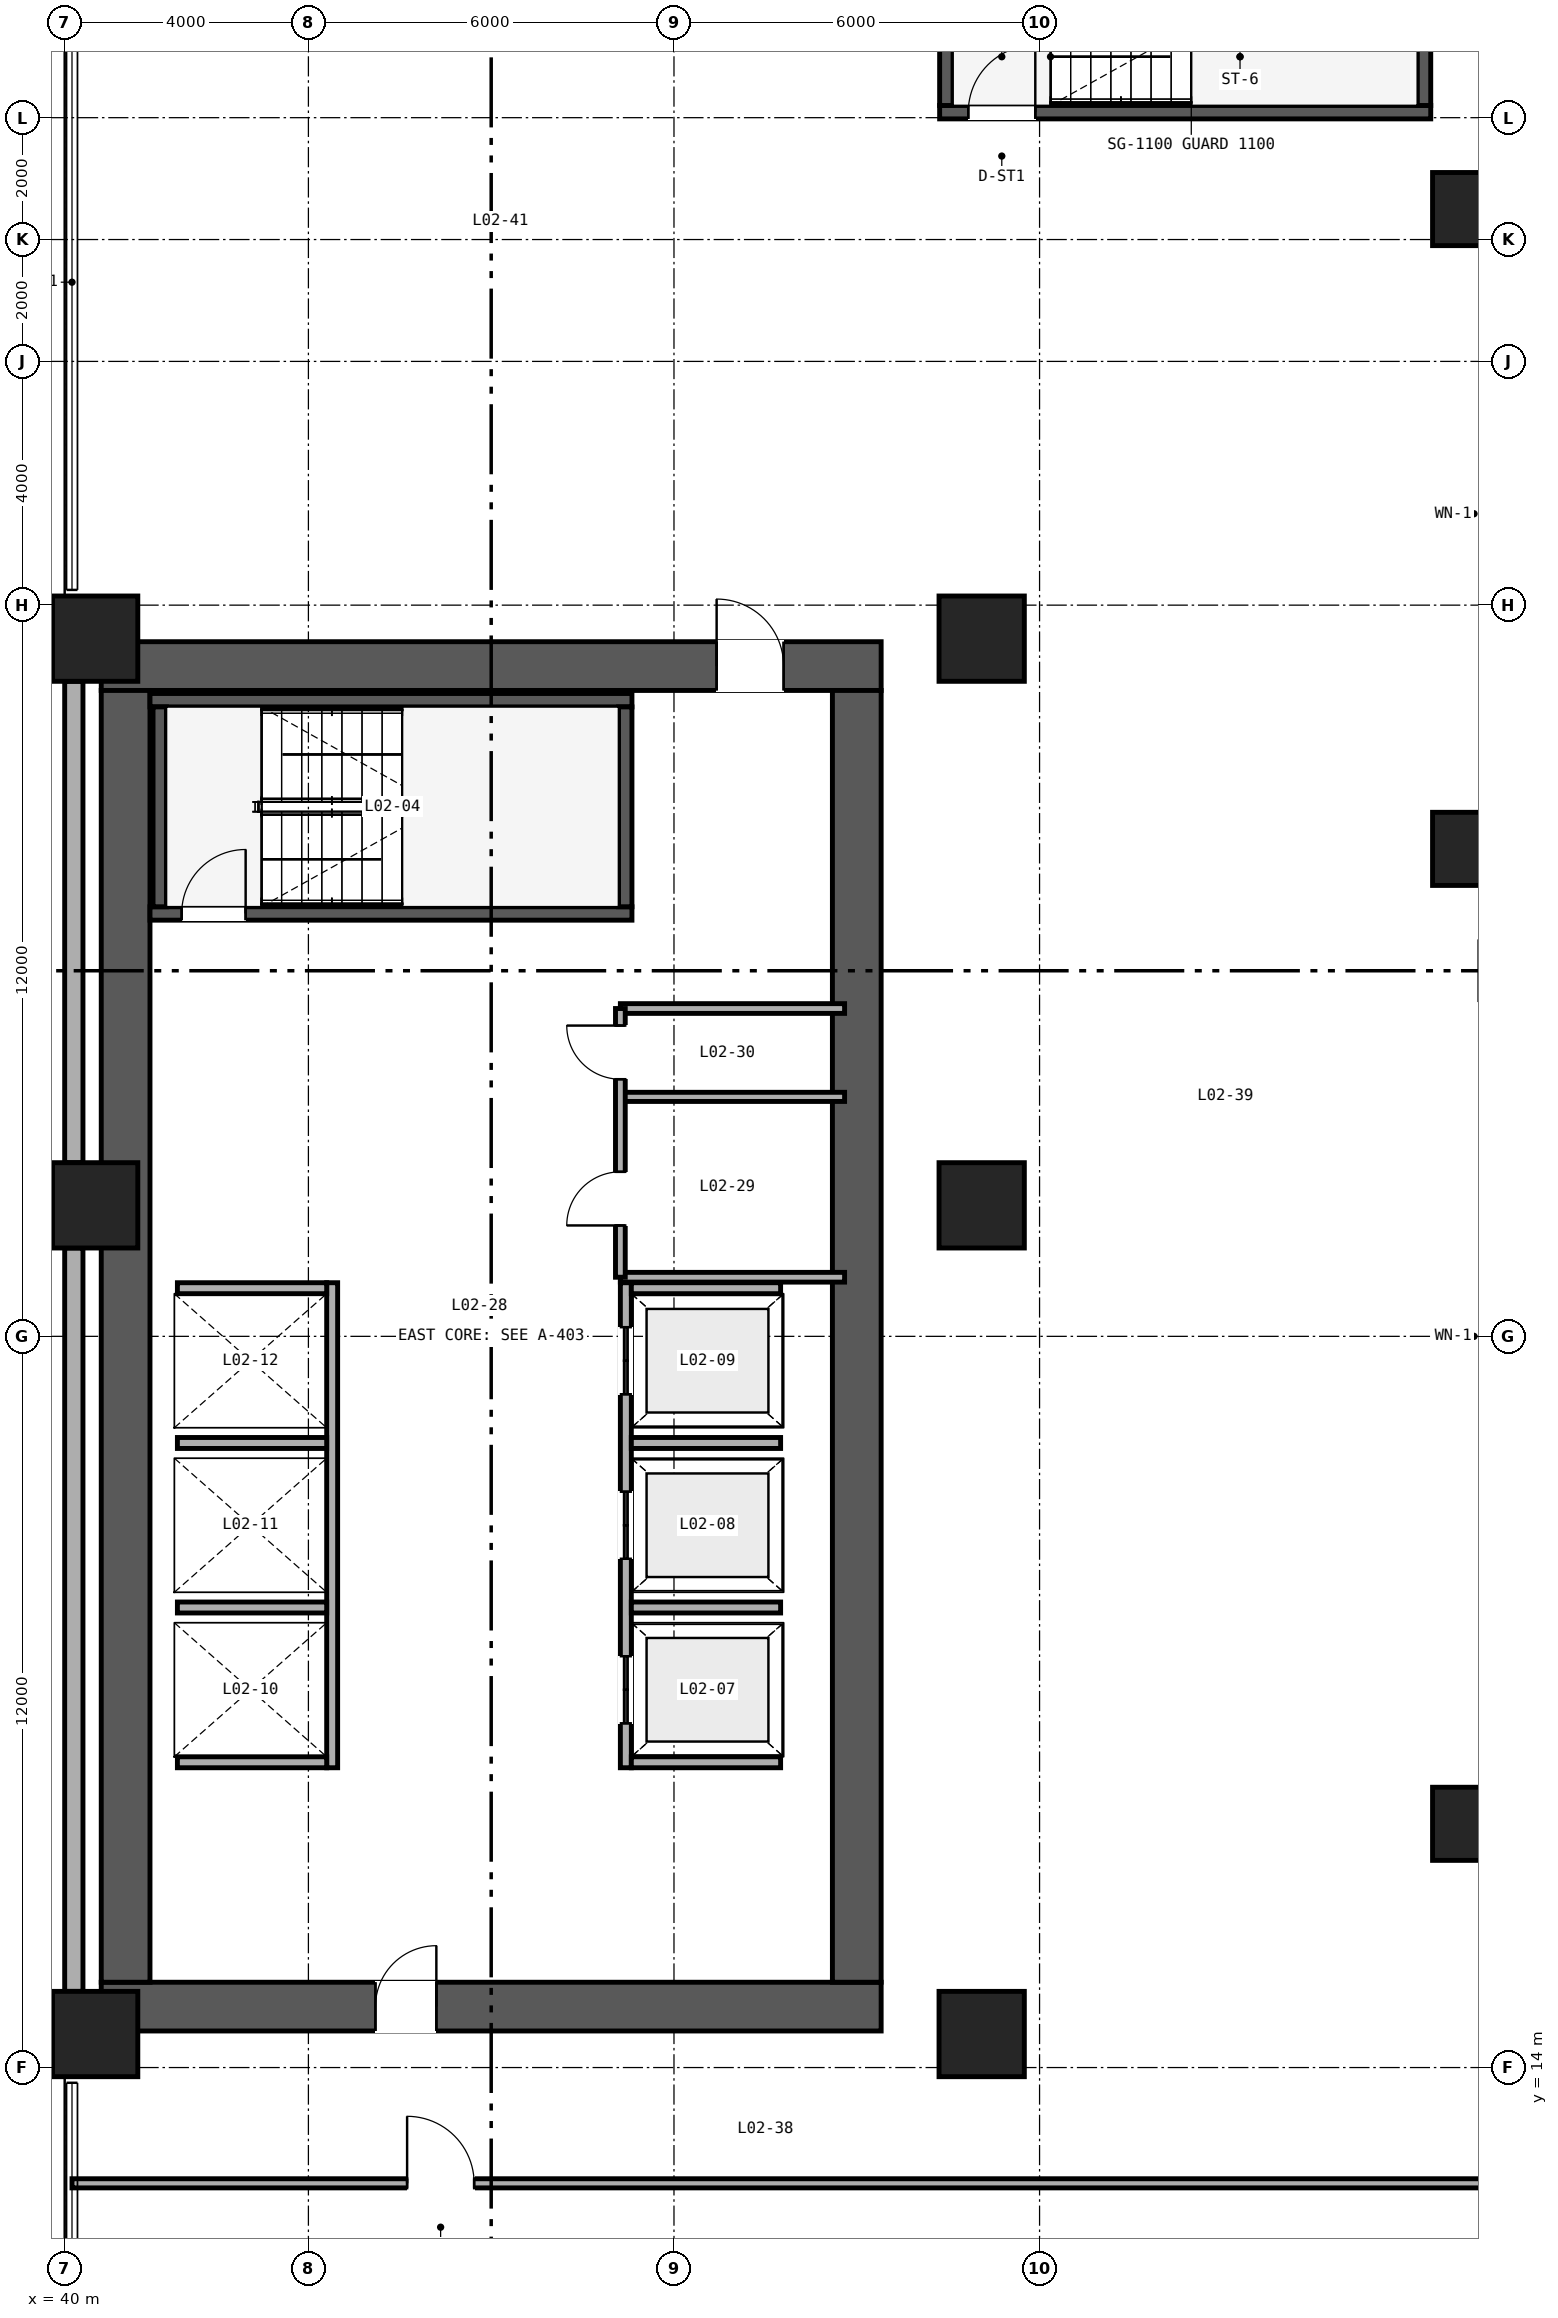
"""IFC4 building model, lengths in metres.
Left out: names, types, materials, properties, quantities, classifications, styles, units other than length and angle.
Written with IfcOpenShell. Run it as: python <this file> out.ifc"""

import sys

from ifc_helpers import new_model, si_unit, direction, frame, frame_2d, origin, origin_2d, place, context, subcontext, project, spatial, rectangle, extrude, source, transform, mapped, element, fill, save


model = new_model("IFC4")
c1 = context("Model", 3, precision=1e-05, world=origin(), true_north=direction((0.0, 1.0)))
c2 = subcontext(c1, "Body", "Model", "MODEL_VIEW")
j1 = project(units=[si_unit("LENGTHUNIT", "METRE"), si_unit("PLANEANGLEUNIT", "RADIAN")], contexts=[c1])
p1 = place(None, origin())
s1 = spatial("IfcSite", under=j1, at=p1, CompositionType="ELEMENT")
p2 = place(p1, origin())
s2 = spatial("IfcBuilding", under=s1, at=p2, CompositionType="ELEMENT")
p3 = place(p2, frame((0.0, 0.0, 6.0)))
s3 = spatial("IfcBuildingStorey", under=s2, at=p3, CompositionType="ELEMENT", Elevation=6.0)
p4 = place(p3, frame((40.6, 15.0, 0.0), z_axis=(0.0, 0.0, 1.0), x_axis=(1.0, 0.0, 0.0)))
e1 = element("IfcWall", 1, at=p4, inside=s3, PredefinedType="SHEAR", context=c2, shape_type="SweptSolid", body=[
    extrude(rectangle(XDim=12.8, YDim=0.8, at=frame_2d((6.4, 0.0))), origin(), (0.0, 0.0, 1.0), 5.08),
])
p5 = place(p4, frame((4.5, 0.0, 0.0)))
e2 = element("IfcOpeningElement", 2, at=p5, cuts=e1, PredefinedType="OPENING", context=c2, shape_type="SweptSolid", body=[
    extrude(rectangle(XDim=1.0, YDim=2.15, at=frame_2d((0.5, 1.075))), frame((0.0, 0.41, 0.0), z_axis=(0.0, -1.0, 0.0), x_axis=(1.0, 0.0, 0.0)), (0.0, 0.0, 1.0), 0.82),
])
p6 = place(p3, frame((40.6, 37.0, 0.0), z_axis=(0.0, 0.0, 1.0), x_axis=(1.0, 0.0, 0.0)))
e3 = element("IfcWall", 3, at=p6, inside=s3, PredefinedType="SHEAR", context=c2, shape_type="SweptSolid", body=[
    extrude(rectangle(XDim=12.8, YDim=0.8, at=frame_2d((6.4, 0.0))), origin(), (0.0, 0.0, 1.0), 5.08),
])
p7 = place(p6, frame((10.1, 0.0, 0.0)))
e4 = element("IfcOpeningElement", 4, at=p7, cuts=e3, PredefinedType="OPENING", context=c2, shape_type="SweptSolid", body=[
    extrude(rectangle(XDim=1.1, YDim=2.15, at=frame_2d((0.55, 1.075))), frame((0.0, 0.41, 0.0), z_axis=(0.0, -1.0, 0.0), x_axis=(1.0, 0.0, 0.0)), (0.0, 0.0, 1.0), 0.82),
])
for number, where, z_axis, x_axis in (
    (5, (41.0, 15.4, 0.0), (0.0, 0.0, 1.0), (0.0, 1.0, 0.0)),
    (6, (53.0, 15.4, 0.0), (0.0, 0.0, 1.0), (0.0, 1.0, 0.0)),
):
    element("IfcWall", number, at=place(p3, frame(where, z_axis=z_axis, x_axis=x_axis)), inside=s3, PredefinedType="SHEAR", context=c2, shape_type="SweptSolid", body=[
        extrude(rectangle(XDim=21.2, YDim=0.8, at=frame_2d((10.6, 0.0))), origin(), (0.0, 0.0, 1.0), 5.08),
    ])
p8 = place(p3, frame((41.4, 32.94, 0.0), z_axis=(0.0, 0.0, 1.0), x_axis=(1.0, 0.0, 0.0)))
e7 = element("IfcWall", 7, at=p8, inside=s3, PredefinedType="SHEAR", context=c2, shape_type="SweptSolid", body=[
    extrude(rectangle(XDim=7.91, YDim=0.22, at=frame_2d((3.955, 0.0))), origin(), (0.0, 0.0, 1.0), 5.2),
])
p9 = place(p8, frame((0.52, 0.0, 0.0)))
e8 = element("IfcOpeningElement", 8, at=p9, cuts=e7, PredefinedType="OPENING", context=c2, shape_type="SweptSolid", body=[
    extrude(rectangle(XDim=1.05, YDim=2.15, at=frame_2d((0.525, 1.075))), frame((0.0, 0.12, 0.0), z_axis=(0.0, -1.0, 0.0), x_axis=(1.0, 0.0, 0.0)), (0.0, 0.0, 1.0), 0.24),
])
p10 = place(p3, frame((41.4, 36.44, 0.0), z_axis=(0.0, 0.0, 1.0), x_axis=(1.0, 0.0, 0.0)))
e9 = element("IfcWall", 9, at=p10, inside=s3, PredefinedType="SHEAR", context=c2, shape_type="SweptSolid", body=[
    extrude(rectangle(XDim=7.91, YDim=0.22, at=frame_2d((3.955, 0.0))), origin(), (0.0, 0.0, 1.0), 5.2),
])
for number, where, z_axis, x_axis in (
    (10, (41.56, 33.05, 0.0), (0.0, 0.0, 1.0), (0.0, 1.0, 0.0)),
    (11, (49.2, 33.05, 0.0), (0.0, 0.0, 1.0), (0.0, 1.0, 0.0)),
):
    element("IfcWall", number, at=place(p3, frame(where, z_axis=z_axis, x_axis=x_axis)), inside=s3, PredefinedType="SHEAR", context=c2, shape_type="SweptSolid", body=[
        extrude(rectangle(XDim=3.28, YDim=0.22, at=frame_2d((1.64, 0.0))), origin(), (0.0, 0.0, 1.0), 5.2),
    ])
p11 = place(p3, frame((54.36, 46.09, 0.0), z_axis=(0.0, 0.0, 1.0), x_axis=(1.0, 0.0, 0.0)))
e12 = element("IfcWall", 12, at=p11, inside=s3, PredefinedType="SHEAR", context=c2, shape_type="SweptSolid", body=[
    extrude(rectangle(XDim=8.06, YDim=0.22, at=frame_2d((4.03, 0.0))), origin(), (0.0, 0.0, 1.0), 5.2),
])
p12 = place(p11, frame((0.47, 0.0, 0.0)))
e13 = element("IfcOpeningElement", 13, at=p12, cuts=e12, PredefinedType="OPENING", context=c2, shape_type="SweptSolid", body=[
    extrude(rectangle(XDim=1.1, YDim=2.15, at=frame_2d((0.55, 1.075))), frame((0.0, 0.12, 0.0), z_axis=(0.0, -1.0, 0.0), x_axis=(1.0, 0.0, 0.0)), (0.0, 0.0, 1.0), 0.24),
])
for number, where, z_axis, x_axis in (
    (14, (54.47, 46.2, 0.0), (0.0, 0.0, 1.0), (0.0, 1.0, 0.0)),
    (15, (62.31, 46.2, 0.0), (0.0, 0.0, 1.0), (0.0, 1.0, 0.0)),
):
    element("IfcWall", number, at=place(p3, frame(where, z_axis=z_axis, x_axis=x_axis)), inside=s3, PredefinedType="SHEAR", context=c2, shape_type="SweptSolid", body=[
        extrude(rectangle(XDim=3.36, YDim=0.22, at=frame_2d((1.68, 0.0))), origin(), (0.0, 0.0, 1.0), 5.2),
    ])
m1 = source(origin(), c2, "Body", "SweptSolid", [
    extrude(rectangle(XDim=1.2, YDim=1.2, at=origin_2d()), origin(), (0.0, 0.0, 1.0), 5.08),
])
for number, where, z_axis, x_axis in (
    (16, (63.05, 18.0, 0.0), (0.0, 0.0, 1.0), (1.0, 0.0, 0.0)),
    (17, (63.05, 34.0, 0.0), (0.0, 0.0, 1.0), (1.0, 0.0, 0.0)),
    (18, (63.05, 44.5, 0.0), (0.0, 0.0, 1.0), (1.0, 0.0, 0.0)),
):
    element("IfcColumn", number, at=place(p3, frame(where, z_axis=z_axis, x_axis=x_axis)), inside=s3, PredefinedType="COLUMN", context=c2, shape_type="MappedRepresentation", body=[
        mapped(m1, transform((0.0, 0.0, 0.0), scale=1.0)),
    ])
m2 = source(origin(), c2, "Body", "SweptSolid", [
    extrude(rectangle(XDim=1.4, YDim=1.4, at=origin_2d()), origin(), (0.0, 0.0, 1.0), 5.08),
])
for number, where, z_axis, x_axis in (
    (19, (40.5, 14.55, 0.0), (0.0, 0.0, 1.0), (1.0, 0.0, 0.0)),
    (20, (55.05, 14.55, 0.0), (0.0, 0.0, 1.0), (1.0, 0.0, 0.0)),
    (21, (40.5, 28.15, 0.0), (0.0, 0.0, 1.0), (1.0, 0.0, 0.0)),
    (22, (55.05, 28.15, 0.0), (0.0, 0.0, 1.0), (1.0, 0.0, 0.0)),
    (23, (40.5, 37.45, 0.0), (0.0, 0.0, 1.0), (1.0, 0.0, 0.0)),
    (24, (55.05, 37.45, 0.0), (0.0, 0.0, 1.0), (1.0, 0.0, 0.0)),
):
    element("IfcColumn", number, at=place(p3, frame(where, z_axis=z_axis, x_axis=x_axis)), inside=s3, PredefinedType="COLUMN", context=c2, shape_type="MappedRepresentation", body=[
        mapped(m2, transform((0.0, 0.0, 0.0), scale=1.0)),
    ])
p13 = place(p3, frame((40.15, 15.25, 0.0), z_axis=(0.0, 0.0, 1.0), x_axis=(0.0, 1.0, 0.0)))
e25 = element("IfcWall", 25, at=p13, inside=s3, PredefinedType="SOLIDWALL", context=c2, shape_type="SweptSolid", body=[
    extrude(rectangle(XDim=12.2, YDim=0.3, at=frame_2d((6.1, 0.0))), origin(), (0.0, 0.0, 1.0), 4.301),
])
p14 = place(p3, frame((40.15, 28.85, 0.0), z_axis=(0.0, 0.0, 1.0), x_axis=(0.0, 1.0, 0.0)))
e26 = element("IfcWall", 26, at=p14, inside=s3, PredefinedType="SOLIDWALL", context=c2, shape_type="SweptSolid", body=[
    extrude(rectangle(XDim=7.9, YDim=0.3, at=frame_2d((3.95, 0.0))), origin(), (0.0, 0.0, 1.0), 4.623),
])
p15 = place(p3, frame((49.21, 18.92, 0.0), z_axis=(0.0, 0.0, 1.0), x_axis=(0.0, 1.0, 0.0)))
e27 = element("IfcWall", 27, at=p15, inside=s3, PredefinedType="SOLIDWALL", context=c2, shape_type="SweptSolid", body=[
    extrude(rectangle(XDim=7.96, YDim=0.18, at=frame_2d((3.98, 0.0))), origin(), (0.0, 0.0, 1.0), 5.08),
])
p16 = place(p15, frame((0.73, 0.0, 0.0)))
e28 = element("IfcOpeningElement", 28, at=p16, cuts=e27, PredefinedType="OPENING", context=c2, shape_type="SweptSolid", body=[
    extrude(rectangle(XDim=1.1, YDim=2.2, at=frame_2d((0.55, 1.1))), frame((0.0, 0.1, 0.0), z_axis=(0.0, -1.0, 0.0), x_axis=(1.0, 0.0, 0.0)), (0.0, 0.0, 1.0), 0.2),
])
p17 = place(p15, frame((3.43, 0.0, 0.0)))
e29 = element("IfcOpeningElement", 29, at=p17, cuts=e27, PredefinedType="OPENING", context=c2, shape_type="SweptSolid", body=[
    extrude(rectangle(XDim=1.1, YDim=2.2, at=frame_2d((0.55, 1.1))), frame((0.0, 0.1, 0.0), z_axis=(0.0, -1.0, 0.0), x_axis=(1.0, 0.0, 0.0)), (0.0, 0.0, 1.0), 0.2),
])
p18 = place(p15, frame((6.13, 0.0, 0.0)))
e30 = element("IfcOpeningElement", 30, at=p18, cuts=e27, PredefinedType="OPENING", context=c2, shape_type="SweptSolid", body=[
    extrude(rectangle(XDim=1.1, YDim=2.2, at=frame_2d((0.55, 1.1))), frame((0.0, 0.1, 0.0), z_axis=(0.0, -1.0, 0.0), x_axis=(1.0, 0.0, 0.0)), (0.0, 0.0, 1.0), 0.2),
])
for number, where, z_axis, x_axis in (
    (31, (49.3, 19.01, 0.0), (0.0, 0.0, 1.0), (1.0, 0.0, 0.0)),
    (32, (49.3, 26.79, 0.0), (0.0, 0.0, 1.0), (1.0, 0.0, 0.0)),
    (33, (49.3, 21.55, 0.0), (0.0, 0.0, 1.0), (1.0, 0.0, 0.0)),
    (34, (49.3, 24.25, 0.0), (0.0, 0.0, 1.0), (1.0, 0.0, 0.0)),
):
    element("IfcWall", number, at=place(p3, frame(where, z_axis=z_axis, x_axis=x_axis)), inside=s3, PredefinedType="SOLIDWALL", context=c2, shape_type="SweptSolid", body=[
        extrude(rectangle(XDim=2.45, YDim=0.18, at=frame_2d((1.225, 0.0))), origin(), (0.0, 0.0, 1.0), 5.08),
    ])
p19 = place(p3, frame((44.39, 18.92, 0.0), z_axis=(0.0, 0.0, 1.0), x_axis=(0.0, 1.0, 0.0)))
e35 = element("IfcWall", 35, at=p19, inside=s3, PredefinedType="SOLIDWALL", context=c2, shape_type="SweptSolid", body=[
    extrude(rectangle(XDim=7.96, YDim=0.18, at=frame_2d((3.98, 0.0))), origin(), (0.0, 0.0, 1.0), 5.08),
])
for number, where, z_axis, x_axis in (
    (36, (41.85, 19.01, 0.0), (0.0, 0.0, 1.0), (1.0, 0.0, 0.0)),
    (37, (41.85, 26.79, 0.0), (0.0, 0.0, 1.0), (1.0, 0.0, 0.0)),
    (38, (41.85, 21.55, 0.0), (0.0, 0.0, 1.0), (1.0, 0.0, 0.0)),
    (39, (41.85, 24.25, 0.0), (0.0, 0.0, 1.0), (1.0, 0.0, 0.0)),
):
    element("IfcWall", number, at=place(p3, frame(where, z_axis=z_axis, x_axis=x_axis)), inside=s3, PredefinedType="SOLIDWALL", context=c2, shape_type="SweptSolid", body=[
        extrude(rectangle(XDim=2.45, YDim=0.18, at=frame_2d((1.225, 0.0))), origin(), (0.0, 0.0, 1.0), 5.08),
    ])
p20 = place(p3, frame((49.12, 26.97, 0.0), z_axis=(0.0, 0.0, 1.0), x_axis=(1.0, 0.0, 0.0)))
e40 = element("IfcWall", 40, at=p20, inside=s3, PredefinedType="PARTITIONING", context=c2, shape_type="SweptSolid", body=[
    extrude(rectangle(XDim=3.68, YDim=0.16, at=frame_2d((1.84, 0.0))), origin(), (0.0, 0.0, 1.0), 5.08),
])
p21 = place(p3, frame((49.12, 31.38, 0.0), z_axis=(0.0, 0.0, 1.0), x_axis=(1.0, 0.0, 0.0)))
e41 = element("IfcWall", 41, at=p21, inside=s3, PredefinedType="PARTITIONING", context=c2, shape_type="SweptSolid", body=[
    extrude(rectangle(XDim=3.68, YDim=0.16, at=frame_2d((1.84, 0.0))), origin(), (0.0, 0.0, 1.0), 3.98),
])
p22 = place(p3, frame((49.12, 29.93, 0.0), z_axis=(0.0, 0.0, 1.0), x_axis=(1.0, 0.0, 0.0)))
e42 = element("IfcWall", 42, at=p22, inside=s3, PredefinedType="PARTITIONING", context=c2, shape_type="SweptSolid", body=[
    extrude(rectangle(XDim=3.68, YDim=0.15, at=frame_2d((1.84, 0.0))), origin(), (0.0, 0.0, 1.0), 5.08),
])
p23 = place(p3, frame((49.12, 26.97, 0.0), z_axis=(0.0, 0.0, 1.0), x_axis=(0.0, 1.0, 0.0)))
e43 = element("IfcWall", 43, at=p23, inside=s3, PredefinedType="PARTITIONING", context=c2, shape_type="SweptSolid", body=[
    extrude(rectangle(XDim=4.41, YDim=0.16, at=frame_2d((2.205, 0.0))), origin(), (0.0, 0.0, 1.0), 3.98),
])
p24 = place(p23, frame((0.85, 0.0, 0.0)))
e44 = element("IfcOpeningElement", 44, at=p24, cuts=e43, PredefinedType="OPENING", context=c2, shape_type="SweptSolid", body=[
    extrude(rectangle(XDim=0.88, YDim=2.15, at=frame_2d((0.44, 1.075))), frame((0.0, 0.09, 0.0), z_axis=(0.0, -1.0, 0.0), x_axis=(1.0, 0.0, 0.0)), (0.0, 0.0, 1.0), 0.18),
])
p25 = place(p23, frame((3.25, 0.0, 0.0)))
e45 = element("IfcOpeningElement", 45, at=p25, cuts=e43, PredefinedType="OPENING", context=c2, shape_type="SweptSolid", body=[
    extrude(rectangle(XDim=0.88, YDim=2.15, at=frame_2d((0.44, 1.075))), frame((0.0, 0.09, 0.0), z_axis=(0.0, -1.0, 0.0), x_axis=(1.0, 0.0, 0.0)), (0.0, 0.0, 1.0), 0.18),
])
p26 = place(p3, frame((40.12, 12.1, 0.0), z_axis=(0.0, 0.0, 1.0), x_axis=(1.0, 0.0, 0.0)))
e46 = element("IfcWall", 46, at=p26, inside=s3, PredefinedType="PARTITIONING", context=c2, shape_type="SweptSolid", body=[
    extrude(rectangle(XDim=23.68, YDim=0.15, at=frame_2d((11.84, 0.0))), origin(), (0.0, 0.0, 1.0), 4.301),
])
p27 = place(p26, frame((5.5, 0.0, 0.0)))
e47 = element("IfcOpeningElement", 47, at=p27, cuts=e46, PredefinedType="OPENING", context=c2, shape_type="SweptSolid", body=[
    extrude(rectangle(XDim=1.1, YDim=2.15, at=frame_2d((0.55, 1.075))), frame((0.0, 0.085, 0.0), z_axis=(0.0, -1.0, 0.0), x_axis=(1.0, 0.0, 0.0)), (0.0, 0.0, 1.0), 0.17),
])
m3 = source(origin(), c2, "Body", "SweptSolid", [
    extrude(rectangle(XDim=1.05, YDim=2.15, at=frame_2d((0.525, 1.075))), frame((0.0, 0.025, 0.0), z_axis=(0.0, -1.0, 0.0), x_axis=(1.0, 0.0, 0.0)), (0.0, 0.0, 1.0), 0.05),
])
p28 = place(p9, origin())
e48 = element("IfcDoor", 48, at=p28, inside=s3, OperationType="SINGLE_SWING_RIGHT", PredefinedType="DOOR", context=c2, shape_type="MappedRepresentation", body=[
    mapped(m3, transform((0.0, 0.0, 0.0), scale=1.0)),
])
fill(e8, e48)
m4 = source(origin(), c2, "Body", "SweptSolid", [
    extrude(rectangle(XDim=1.1, YDim=2.15, at=frame_2d((0.55, 1.075))), frame((0.0, 0.025, 0.0), z_axis=(0.0, -1.0, 0.0), x_axis=(1.0, 0.0, 0.0)), (0.0, 0.0, 1.0), 0.05),
])
p29 = place(p12, origin())
e49 = element("IfcDoor", 49, at=p29, inside=s3, OperationType="SINGLE_SWING_RIGHT", PredefinedType="DOOR", context=c2, shape_type="MappedRepresentation", body=[
    mapped(m4, transform((0.0, 0.0, 0.0), scale=1.0)),
])
fill(e13, e49)
m5 = source(origin(), c2, "Body", "SweptSolid", [
    extrude(rectangle(XDim=1.1, YDim=2.2, at=frame_2d((0.55, 1.1))), frame((0.0, 0.025, 0.0), z_axis=(0.0, -1.0, 0.0), x_axis=(1.0, 0.0, 0.0)), (0.0, 0.0, 1.0), 0.05),
])
p30 = place(p16, origin())
e50 = element("IfcDoor", 50, at=p30, inside=s3, OperationType="DOUBLE_DOOR_SLIDING", PredefinedType="DOOR", context=c2, shape_type="MappedRepresentation", body=[
    mapped(m5, transform((0.0, 0.0, 0.0), scale=1.0)),
])
fill(e28, e50)
p31 = place(p17, origin())
e51 = element("IfcDoor", 51, at=p31, inside=s3, OperationType="DOUBLE_DOOR_SLIDING", PredefinedType="DOOR", context=c2, shape_type="MappedRepresentation", body=[
    mapped(m5, transform((0.0, 0.0, 0.0), scale=1.0)),
])
fill(e29, e51)
p32 = place(p18, origin())
e52 = element("IfcDoor", 52, at=p32, inside=s3, OperationType="DOUBLE_DOOR_SLIDING", PredefinedType="DOOR", context=c2, shape_type="MappedRepresentation", body=[
    mapped(m5, transform((0.0, 0.0, 0.0), scale=1.0)),
])
fill(e30, e52)
m6 = source(origin(), c2, "Body", "SweptSolid", [
    extrude(rectangle(XDim=1.0, YDim=2.15, at=frame_2d((0.5, 1.075))), frame((0.0, 0.025, 0.0), z_axis=(0.0, -1.0, 0.0), x_axis=(1.0, 0.0, 0.0)), (0.0, 0.0, 1.0), 0.05),
])
p33 = place(p5, origin())
e53 = element("IfcDoor", 53, at=p33, inside=s3, OperationType="SINGLE_SWING_RIGHT", PredefinedType="DOOR", context=c2, shape_type="MappedRepresentation", body=[
    mapped(m6, transform((0.0, 0.0, 0.0), scale=1.0)),
])
fill(e2, e53)
p34 = place(p7, origin())
e54 = element("IfcDoor", 54, at=p34, inside=s3, OperationType="SINGLE_SWING_LEFT", PredefinedType="DOOR", context=c2, shape_type="MappedRepresentation", body=[
    mapped(m4, transform((0.0, 0.0, 0.0), scale=1.0)),
])
fill(e4, e54)
m7 = source(origin(), c2, "Body", "SweptSolid", [
    extrude(rectangle(XDim=0.88, YDim=2.15, at=frame_2d((0.44, 1.075))), frame((0.0, 0.025, 0.0), z_axis=(0.0, -1.0, 0.0), x_axis=(1.0, 0.0, 0.0)), (0.0, 0.0, 1.0), 0.05),
])
p35 = place(p24, origin())
e55 = element("IfcDoor", 55, at=p35, inside=s3, OperationType="SINGLE_SWING_LEFT", PredefinedType="DOOR", context=c2, shape_type="MappedRepresentation", body=[
    mapped(m7, transform((0.0, 0.0, 0.0), scale=1.0)),
])
fill(e44, e55)
p36 = place(p25, origin())
e56 = element("IfcDoor", 56, at=p36, inside=s3, OperationType="SINGLE_SWING_RIGHT", PredefinedType="DOOR", context=c2, shape_type="MappedRepresentation", body=[
    mapped(m7, transform((0.0, 0.0, 0.0), scale=1.0)),
])
fill(e45, e56)
p37 = place(p27, origin())
e57 = element("IfcDoor", 57, at=p37, inside=s3, OperationType="SINGLE_SWING_LEFT", PredefinedType="DOOR", context=c2, shape_type="MappedRepresentation", body=[
    mapped(m4, transform((0.0, 0.0, 0.0), scale=1.0)),
])
fill(e47, e57)
save(model, sys.argv[1])
